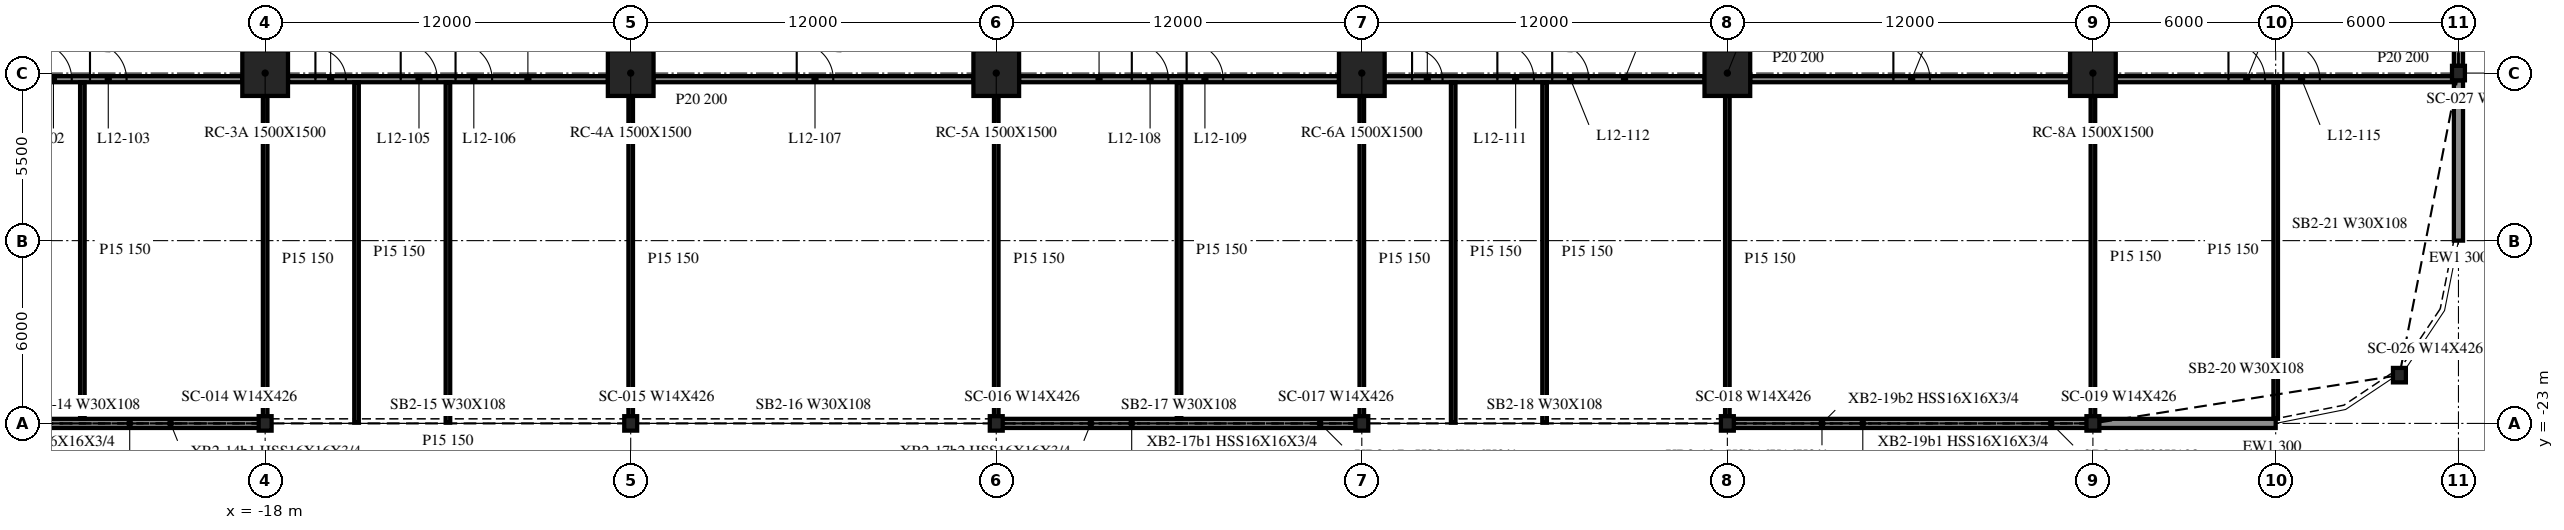
"""IFC4 building model, lengths in metres.
Left out: names, types, materials, properties, quantities, classifications, styles, units other than length and angle.
Written with IfcOpenShell. Run it as: python <this file> out.ifc"""

import sys

from ifc_helpers import new_model, si_unit, direction, frame, frame_2d, origin, origin_2d, place, context, subcontext, project, spatial, rectangle, i_section, extrude, element, fill, save


model = new_model("IFC4")
c1 = context("Model", 3, precision=1e-05, world=origin(), true_north=direction((0.0, 1.0)))
c2 = subcontext(c1, "Body", "Model", "MODEL_VIEW")
j1 = project(units=[si_unit("LENGTHUNIT", "METRE"), si_unit("PLANEANGLEUNIT", "RADIAN")], contexts=[c1])
p1 = place(None, origin())
s1 = spatial("IfcSite", under=j1, at=p1, CompositionType="ELEMENT")
p2 = place(p1, origin())
s2 = spatial("IfcBuilding", under=s1, at=p2, CompositionType="ELEMENT")
p3 = place(p2, frame((0.0, 0.0, 54.6)))
s3 = spatial("IfcBuildingStorey", under=s2, at=p3, CompositionType="ELEMENT", Elevation=54.6)
for number, where, z_axis, x_axis in (
    (1, (-18.0, -11.5, -0.34), (0.0, 0.0, 1.0), (1.0, 0.0, 0.0)),
    (2, (-6.0, -11.5, -0.34), (0.0, 0.0, 1.0), (1.0, 0.0, 0.0)),
    (3, (6.0, -11.5, -0.34), (0.0, 0.0, 1.0), (1.0, 0.0, 0.0)),
    (4, (18.0, -11.5, -0.34), (0.0, 0.0, 1.0), (1.0, 0.0, 0.0)),
    (5, (30.0, -11.5, -0.34), (0.0, 0.0, 1.0), (1.0, 0.0, 0.0)),
    (6, (42.0, -11.5, -0.34), (0.0, 0.0, 1.0), (1.0, 0.0, 0.0)),
):
    element("IfcColumn", number, at=place(p3, frame(where, z_axis=z_axis, x_axis=x_axis)), inside=s3, PredefinedType="COLUMN", context=c2, shape_type="SweptSolid", body=[
        extrude(rectangle(XDim=1.5, YDim=1.5, at=origin_2d()), origin(), (0.0, 0.0, 1.0), 4.3),
    ])
for number, where, z_axis, x_axis in (
    (7, (-18.0, -23.0, -0.34), (0.0, 0.0, 1.0), (1.0, 0.0, 0.0)),
    (8, (-6.0, -23.0, -0.34), (0.0, 0.0, 1.0), (1.0, 0.0, 0.0)),
    (9, (6.0, -23.0, -0.34), (0.0, 0.0, 1.0), (1.0, 0.0, 0.0)),
    (10, (18.0, -23.0, -0.34), (0.0, 0.0, 1.0), (1.0, 0.0, 0.0)),
    (11, (30.0, -23.0, -0.34), (0.0, 0.0, 1.0), (1.0, 0.0, 0.0)),
    (12, (42.0, -23.0, -0.34), (0.0, 0.0, 1.0), (1.0, 0.0, 0.0)),
    (13, (52.062, -21.416, -0.34), (0.0, 0.0, 1.0), (1.0, 0.0, 0.0)),
    (14, (54.0, -11.5, -0.34), (0.0, 0.0, 1.0), (1.0, 0.0, 0.0)),
):
    element("IfcColumn", number, at=place(p3, frame(where, z_axis=z_axis, x_axis=x_axis)), inside=s3, PredefinedType="COLUMN", context=c2, shape_type="SweptSolid", body=[
        extrude(i_section(OverallWidth=0.424, OverallDepth=0.475, WebThickness=0.048, FlangeThickness=0.077, at=origin_2d()), origin(), (0.0, 0.0, 1.0), 4.3),
    ])
for number, where, z_axis, x_axis in (
    (15, (-29.976, -23.0, 0.0), (0.0, 0.0, 1.0), (1.0, 0.0, 0.0)),
    (16, (6.024, -23.0, 0.0), (0.0, 0.0, 1.0), (1.0, 0.0, 0.0)),
    (17, (30.024, -23.0, 0.0), (0.0, 0.0, 1.0), (1.0, 0.0, 0.0)),
):
    element("IfcWall", number, at=place(p3, frame(where, z_axis=z_axis, x_axis=x_axis)), inside=s3, PredefinedType="NOTDEFINED", context=c2, shape_type="SweptSolid", body=[
        extrude(rectangle(XDim=11.952, YDim=0.3, at=frame_2d((5.976, 0.0))), origin(), (0.0, 0.0, 1.0), 3.203),
    ])
p4 = place(p3, frame((42.024, -23.0, 0.0), z_axis=(0.0, 0.0, 1.0), x_axis=(1.0, 0.0, 0.0)))
e18 = element("IfcWall", 18, at=p4, inside=s3, PredefinedType="NOTDEFINED", context=c2, shape_type="SweptSolid", body=[
    extrude(rectangle(XDim=5.976, YDim=0.3, at=frame_2d((2.988, 0.0))), origin(), (0.0, 0.0, 1.0), 3.203),
])
p5 = place(p3, frame((54.0, -17.0, 0.0), z_axis=(0.0, 0.0, 1.0), x_axis=(0.0, 1.0, 0.0)))
e19 = element("IfcWall", 19, at=p5, inside=s3, PredefinedType="NOTDEFINED", context=c2, shape_type="SweptSolid", body=[
    extrude(rectangle(XDim=5.262, YDim=0.3, at=frame_2d((2.631, 0.0))), origin(), (0.0, 0.0, 1.0), 3.203),
])
p6 = place(p3, frame((54.0, -11.262, 0.0), z_axis=(0.0, 0.0, 1.0), x_axis=(0.0, 1.0, 0.0)))
e20 = element("IfcWall", 20, at=p6, inside=s3, PredefinedType="NOTDEFINED", context=c2, shape_type="SweptSolid", body=[
    extrude(rectangle(XDim=11.024, YDim=0.3, at=frame_2d((5.512, 0.0))), origin(), (0.0, 0.0, 1.0), 3.203),
])
p7 = place(p3, frame((-29.25, -11.7, 0.0), z_axis=(0.0, 0.0, 1.0), x_axis=(1.0, 0.0, 0.0)))
e21 = element("IfcWall", 21, at=p7, inside=s3, PredefinedType="PARTITIONING", context=c2, shape_type="SweptSolid", body=[
    extrude(rectangle(XDim=10.5, YDim=0.2, at=frame_2d((5.25, 0.0))), origin(), (0.0, 0.0, 1.0), 3.96),
])
p8 = place(p7, frame((3.7, 0.0, 0.0)))
e22 = element("IfcOpeningElement", 22, at=p8, cuts=e21, PredefinedType="OPENING", context=c2, shape_type="SweptSolid", body=[
    extrude(rectangle(XDim=1.2, YDim=2.1, at=frame_2d((0.6, 1.05))), frame((0.0, 0.11, 0.0), z_axis=(0.0, -1.0, 0.0), x_axis=(1.0, 0.0, 0.0)), (0.0, 0.0, 1.0), 0.22),
])
p9 = place(p7, frame((5.5, 0.0, 0.0)))
e23 = element("IfcOpeningElement", 23, at=p9, cuts=e21, PredefinedType="OPENING", context=c2, shape_type="SweptSolid", body=[
    extrude(rectangle(XDim=1.2, YDim=2.1, at=frame_2d((0.6, 1.05))), frame((0.0, 0.11, 0.0), z_axis=(0.0, -1.0, 0.0), x_axis=(1.0, 0.0, 0.0)), (0.0, 0.0, 1.0), 0.22),
])
p10 = place(p3, frame((-17.25, -11.7, 0.0), z_axis=(0.0, 0.0, 1.0), x_axis=(1.0, 0.0, 0.0)))
e24 = element("IfcWall", 24, at=p10, inside=s3, PredefinedType="PARTITIONING", context=c2, shape_type="SweptSolid", body=[
    extrude(rectangle(XDim=10.5, YDim=0.2, at=frame_2d((5.25, 0.0))), origin(), (0.0, 0.0, 1.0), 3.96),
])
p11 = place(p10, frame((0.9, 0.0, 0.0)))
e25 = element("IfcOpeningElement", 25, at=p11, cuts=e24, PredefinedType="OPENING", context=c2, shape_type="SweptSolid", body=[
    extrude(rectangle(XDim=1.0, YDim=2.1, at=frame_2d((0.5, 1.05))), frame((0.0, 0.11, 0.0), z_axis=(0.0, -1.0, 0.0), x_axis=(1.0, 0.0, 0.0)), (0.0, 0.0, 1.0), 0.22),
])
p12 = place(p10, frame((3.7, 0.0, 0.0)))
e26 = element("IfcOpeningElement", 26, at=p12, cuts=e24, PredefinedType="OPENING", context=c2, shape_type="SweptSolid", body=[
    extrude(rectangle(XDim=1.2, YDim=2.1, at=frame_2d((0.6, 1.05))), frame((0.0, 0.11, 0.0), z_axis=(0.0, -1.0, 0.0), x_axis=(1.0, 0.0, 0.0)), (0.0, 0.0, 1.0), 0.22),
])
p13 = place(p10, frame((5.5, 0.0, 0.0)))
e27 = element("IfcOpeningElement", 27, at=p13, cuts=e24, PredefinedType="OPENING", context=c2, shape_type="SweptSolid", body=[
    extrude(rectangle(XDim=1.2, YDim=2.1, at=frame_2d((0.6, 1.05))), frame((0.0, 0.11, 0.0), z_axis=(0.0, -1.0, 0.0), x_axis=(1.0, 0.0, 0.0)), (0.0, 0.0, 1.0), 0.22),
])
p14 = place(p3, frame((-5.25, -11.7, 0.0), z_axis=(0.0, 0.0, 1.0), x_axis=(1.0, 0.0, 0.0)))
e28 = element("IfcWall", 28, at=p14, inside=s3, PredefinedType="PARTITIONING", context=c2, shape_type="SweptSolid", body=[
    extrude(rectangle(XDim=10.5, YDim=0.2, at=frame_2d((5.25, 0.0))), origin(), (0.0, 0.0, 1.0), 3.96),
])
p15 = place(p14, frame((4.7, 0.0, 0.0)))
e29 = element("IfcOpeningElement", 29, at=p15, cuts=e28, PredefinedType="OPENING", context=c2, shape_type="SweptSolid", body=[
    extrude(rectangle(XDim=1.2, YDim=2.1, at=frame_2d((0.6, 1.05))), frame((0.0, 0.11, 0.0), z_axis=(0.0, -1.0, 0.0), x_axis=(1.0, 0.0, 0.0)), (0.0, 0.0, 1.0), 0.22),
])
p16 = place(p3, frame((6.75, -11.7, 0.0), z_axis=(0.0, 0.0, 1.0), x_axis=(1.0, 0.0, 0.0)))
e30 = element("IfcWall", 30, at=p16, inside=s3, PredefinedType="PARTITIONING", context=c2, shape_type="SweptSolid", body=[
    extrude(rectangle(XDim=10.5, YDim=0.2, at=frame_2d((5.25, 0.0))), origin(), (0.0, 0.0, 1.0), 3.96),
])
p17 = place(p16, frame((3.7, 0.0, 0.0)))
e31 = element("IfcOpeningElement", 31, at=p17, cuts=e30, PredefinedType="OPENING", context=c2, shape_type="SweptSolid", body=[
    extrude(rectangle(XDim=1.2, YDim=2.1, at=frame_2d((0.6, 1.05))), frame((0.0, 0.11, 0.0), z_axis=(0.0, -1.0, 0.0), x_axis=(1.0, 0.0, 0.0)), (0.0, 0.0, 1.0), 0.22),
])
p18 = place(p16, frame((5.5, 0.0, 0.0)))
e32 = element("IfcOpeningElement", 32, at=p18, cuts=e30, PredefinedType="OPENING", context=c2, shape_type="SweptSolid", body=[
    extrude(rectangle(XDim=1.2, YDim=2.1, at=frame_2d((0.6, 1.05))), frame((0.0, 0.11, 0.0), z_axis=(0.0, -1.0, 0.0), x_axis=(1.0, 0.0, 0.0)), (0.0, 0.0, 1.0), 0.22),
])
p19 = place(p3, frame((18.75, -11.7, 0.0), z_axis=(0.0, 0.0, 1.0), x_axis=(1.0, 0.0, 0.0)))
e33 = element("IfcWall", 33, at=p19, inside=s3, PredefinedType="PARTITIONING", context=c2, shape_type="SweptSolid", body=[
    extrude(rectangle(XDim=10.5, YDim=0.2, at=frame_2d((5.25, 0.0))), origin(), (0.0, 0.0, 1.0), 3.96),
])
p20 = place(p19, frame((0.9, 0.0, 0.0)))
e34 = element("IfcOpeningElement", 34, at=p20, cuts=e33, PredefinedType="OPENING", context=c2, shape_type="SweptSolid", body=[
    extrude(rectangle(XDim=1.0, YDim=2.1, at=frame_2d((0.5, 1.05))), frame((0.0, 0.11, 0.0), z_axis=(0.0, -1.0, 0.0), x_axis=(1.0, 0.0, 0.0)), (0.0, 0.0, 1.0), 0.22),
])
p21 = place(p19, frame((3.7, 0.0, 0.0)))
e35 = element("IfcOpeningElement", 35, at=p21, cuts=e33, PredefinedType="OPENING", context=c2, shape_type="SweptSolid", body=[
    extrude(rectangle(XDim=1.2, YDim=2.1, at=frame_2d((0.6, 1.05))), frame((0.0, 0.11, 0.0), z_axis=(0.0, -1.0, 0.0), x_axis=(1.0, 0.0, 0.0)), (0.0, 0.0, 1.0), 0.22),
])
p22 = place(p19, frame((5.5, 0.0, 0.0)))
e36 = element("IfcOpeningElement", 36, at=p22, cuts=e33, PredefinedType="OPENING", context=c2, shape_type="SweptSolid", body=[
    extrude(rectangle(XDim=1.2, YDim=2.1, at=frame_2d((0.6, 1.05))), frame((0.0, 0.11, 0.0), z_axis=(0.0, -1.0, 0.0), x_axis=(1.0, 0.0, 0.0)), (0.0, 0.0, 1.0), 0.22),
])
p23 = place(p3, frame((30.75, -11.7, 0.0), z_axis=(0.0, 0.0, 1.0), x_axis=(1.0, 0.0, 0.0)))
e37 = element("IfcWall", 37, at=p23, inside=s3, PredefinedType="PARTITIONING", context=c2, shape_type="SweptSolid", body=[
    extrude(rectangle(XDim=10.5, YDim=0.2, at=frame_2d((5.25, 0.0))), origin(), (0.0, 0.0, 1.0), 3.96),
])
p24 = place(p23, frame((4.7, 0.0, 0.0)))
e38 = element("IfcOpeningElement", 38, at=p24, cuts=e37, PredefinedType="OPENING", context=c2, shape_type="SweptSolid", body=[
    extrude(rectangle(XDim=1.2, YDim=2.1, at=frame_2d((0.6, 1.05))), frame((0.0, 0.11, 0.0), z_axis=(0.0, -1.0, 0.0), x_axis=(1.0, 0.0, 0.0)), (0.0, 0.0, 1.0), 0.22),
])
p25 = place(p3, frame((42.75, -11.7, 0.0), z_axis=(0.0, 0.0, 1.0), x_axis=(1.0, 0.0, 0.0)))
e39 = element("IfcWall", 39, at=p25, inside=s3, PredefinedType="PARTITIONING", context=c2, shape_type="SweptSolid", body=[
    extrude(rectangle(XDim=11.1, YDim=0.2, at=frame_2d((5.55, 0.0))), origin(), (0.0, 0.0, 1.0), 3.96),
])
p26 = place(p25, frame((3.7, 0.0, 0.0)))
e40 = element("IfcOpeningElement", 40, at=p26, cuts=e39, PredefinedType="OPENING", context=c2, shape_type="SweptSolid", body=[
    extrude(rectangle(XDim=1.2, YDim=2.1, at=frame_2d((0.6, 1.05))), frame((0.0, 0.11, 0.0), z_axis=(0.0, -1.0, 0.0), x_axis=(1.0, 0.0, 0.0)), (0.0, 0.0, 1.0), 0.22),
])
p27 = place(p25, frame((5.5, 0.0, 0.0)))
e41 = element("IfcOpeningElement", 41, at=p27, cuts=e39, PredefinedType="OPENING", context=c2, shape_type="SweptSolid", body=[
    extrude(rectangle(XDim=1.2, YDim=2.1, at=frame_2d((0.6, 1.05))), frame((0.0, 0.11, 0.0), z_axis=(0.0, -1.0, 0.0), x_axis=(1.0, 0.0, 0.0)), (0.0, 0.0, 1.0), 0.22),
])
p28 = place(p3, frame((-24.0, -22.85, 0.0), z_axis=(0.0, 0.0, 1.0), x_axis=(0.0, 1.0, 0.0)))
e42 = element("IfcWall", 42, at=p28, inside=s3, PredefinedType="PARTITIONING", context=c2, shape_type="SweptSolid", body=[
    extrude(rectangle(XDim=11.05, YDim=0.15, at=frame_2d((5.525, 0.0))), origin(), (0.0, 0.0, 1.0), 3.96),
])
p29 = place(p3, frame((-18.0, -22.975, 0.0), z_axis=(0.0, 0.0, 1.0), x_axis=(0.0, 1.0, 0.0)))
e43 = element("IfcWall", 43, at=p29, inside=s3, PredefinedType="PARTITIONING", context=c2, shape_type="SweptSolid", body=[
    extrude(rectangle(XDim=10.725, YDim=0.15, at=frame_2d((5.363, 0.0))), origin(), (0.0, 0.0, 1.0), 3.96),
])
for number, where, z_axis, x_axis in (
    (44, (-15.0, -22.975, 0.0), (0.0, 0.0, 1.0), (0.0, 1.0, 0.0)),
    (45, (-12.0, -22.975, 0.0), (0.0, 0.0, 1.0), (0.0, 1.0, 0.0)),
):
    element("IfcWall", number, at=place(p3, frame(where, z_axis=z_axis, x_axis=x_axis)), inside=s3, PredefinedType="PARTITIONING", context=c2, shape_type="SweptSolid", body=[
        extrude(rectangle(XDim=11.175, YDim=0.15, at=frame_2d((5.587, 0.0))), origin(), (0.0, 0.0, 1.0), 3.96),
    ])
for number, where, z_axis, x_axis in (
    (46, (-6.0, -22.975, 0.0), (0.0, 0.0, 1.0), (0.0, 1.0, 0.0)),
    (47, (6.0, -22.975, 0.0), (0.0, 0.0, 1.0), (0.0, 1.0, 0.0)),
):
    element("IfcWall", number, at=place(p3, frame(where, z_axis=z_axis, x_axis=x_axis)), inside=s3, PredefinedType="PARTITIONING", context=c2, shape_type="SweptSolid", body=[
        extrude(rectangle(XDim=10.725, YDim=0.15, at=frame_2d((5.363, 0.0))), origin(), (0.0, 0.0, 1.0), 3.96),
    ])
p30 = place(p3, frame((12.0, -22.85, 0.0), z_axis=(0.0, 0.0, 1.0), x_axis=(0.0, 1.0, 0.0)))
e48 = element("IfcWall", 48, at=p30, inside=s3, PredefinedType="PARTITIONING", context=c2, shape_type="SweptSolid", body=[
    extrude(rectangle(XDim=11.05, YDim=0.15, at=frame_2d((5.525, 0.0))), origin(), (0.0, 0.0, 1.0), 3.96),
])
p31 = place(p3, frame((18.0, -22.975, 0.0), z_axis=(0.0, 0.0, 1.0), x_axis=(0.0, 1.0, 0.0)))
e49 = element("IfcWall", 49, at=p31, inside=s3, PredefinedType="PARTITIONING", context=c2, shape_type="SweptSolid", body=[
    extrude(rectangle(XDim=10.725, YDim=0.15, at=frame_2d((5.363, 0.0))), origin(), (0.0, 0.0, 1.0), 3.96),
])
for number, where, z_axis, x_axis in (
    (50, (21.0, -22.975, 0.0), (0.0, 0.0, 1.0), (0.0, 1.0, 0.0)),
    (51, (24.0, -22.975, 0.0), (0.0, 0.0, 1.0), (0.0, 1.0, 0.0)),
):
    element("IfcWall", number, at=place(p3, frame(where, z_axis=z_axis, x_axis=x_axis)), inside=s3, PredefinedType="PARTITIONING", context=c2, shape_type="SweptSolid", body=[
        extrude(rectangle(XDim=11.175, YDim=0.15, at=frame_2d((5.587, 0.0))), origin(), (0.0, 0.0, 1.0), 3.96),
    ])
p32 = place(p3, frame((30.0, -22.975, 0.0), z_axis=(0.0, 0.0, 1.0), x_axis=(0.0, 1.0, 0.0)))
e52 = element("IfcWall", 52, at=p32, inside=s3, PredefinedType="PARTITIONING", context=c2, shape_type="SweptSolid", body=[
    extrude(rectangle(XDim=10.725, YDim=0.15, at=frame_2d((5.363, 0.0))), origin(), (0.0, 0.0, 1.0), 3.96),
])
p33 = place(p3, frame((42.0, -22.85, 0.0), z_axis=(0.0, 0.0, 1.0), x_axis=(0.0, 1.0, 0.0)))
e53 = element("IfcWall", 53, at=p33, inside=s3, PredefinedType="PARTITIONING", context=c2, shape_type="SweptSolid", body=[
    extrude(rectangle(XDim=10.6, YDim=0.15, at=frame_2d((5.3, 0.0))), origin(), (0.0, 0.0, 1.0), 3.96),
])
p34 = place(p3, frame((48.0, -22.847, 0.0), z_axis=(0.0, 0.0, 1.0), x_axis=(0.0, 1.0, 0.0)))
e54 = element("IfcWall", 54, at=p34, inside=s3, PredefinedType="PARTITIONING", context=c2, shape_type="SweptSolid", body=[
    extrude(rectangle(XDim=11.047, YDim=0.15, at=frame_2d((5.523, 0.0))), origin(), (0.0, 0.0, 1.0), 3.96),
])
p35 = place(p8, origin())
e55 = element("IfcDoor", 55, at=p35, inside=s3, OperationType="SINGLE_SWING_RIGHT", PredefinedType="DOOR", context=c2, shape_type="SweptSolid", body=[
    extrude(rectangle(XDim=1.2, YDim=2.1, at=frame_2d((0.6, 1.05))), frame((0.0, 0.025, 0.0), z_axis=(0.0, -1.0, 0.0), x_axis=(1.0, 0.0, 0.0)), (0.0, 0.0, 1.0), 0.05),
])
fill(e22, e55)
p36 = place(p9, origin())
e56 = element("IfcDoor", 56, at=p36, inside=s3, OperationType="SINGLE_SWING_LEFT", PredefinedType="DOOR", context=c2, shape_type="SweptSolid", body=[
    extrude(rectangle(XDim=1.2, YDim=2.1, at=frame_2d((0.6, 1.05))), frame((0.0, 0.025, 0.0), z_axis=(0.0, -1.0, 0.0), x_axis=(1.0, 0.0, 0.0)), (0.0, 0.0, 1.0), 0.05),
])
fill(e23, e56)
p37 = place(p11, origin())
e57 = element("IfcDoor", 57, at=p37, inside=s3, OperationType="SINGLE_SWING_RIGHT", PredefinedType="DOOR", context=c2, shape_type="SweptSolid", body=[
    extrude(rectangle(XDim=1.0, YDim=2.1, at=frame_2d((0.5, 1.05))), frame((0.0, 0.025, 0.0), z_axis=(0.0, -1.0, 0.0), x_axis=(1.0, 0.0, 0.0)), (0.0, 0.0, 1.0), 0.05),
])
fill(e25, e57)
p38 = place(p12, origin())
e58 = element("IfcDoor", 58, at=p38, inside=s3, OperationType="SINGLE_SWING_RIGHT", PredefinedType="DOOR", context=c2, shape_type="SweptSolid", body=[
    extrude(rectangle(XDim=1.2, YDim=2.1, at=frame_2d((0.6, 1.05))), frame((0.0, 0.025, 0.0), z_axis=(0.0, -1.0, 0.0), x_axis=(1.0, 0.0, 0.0)), (0.0, 0.0, 1.0), 0.05),
])
fill(e26, e58)
p39 = place(p13, origin())
e59 = element("IfcDoor", 59, at=p39, inside=s3, OperationType="SINGLE_SWING_LEFT", PredefinedType="DOOR", context=c2, shape_type="SweptSolid", body=[
    extrude(rectangle(XDim=1.2, YDim=2.1, at=frame_2d((0.6, 1.05))), frame((0.0, 0.025, 0.0), z_axis=(0.0, -1.0, 0.0), x_axis=(1.0, 0.0, 0.0)), (0.0, 0.0, 1.0), 0.05),
])
fill(e27, e59)
p40 = place(p15, origin())
e60 = element("IfcDoor", 60, at=p40, inside=s3, OperationType="SINGLE_SWING_LEFT", PredefinedType="DOOR", context=c2, shape_type="SweptSolid", body=[
    extrude(rectangle(XDim=1.2, YDim=2.1, at=frame_2d((0.6, 1.05))), frame((0.0, 0.025, 0.0), z_axis=(0.0, -1.0, 0.0), x_axis=(1.0, 0.0, 0.0)), (0.0, 0.0, 1.0), 0.05),
])
fill(e29, e60)
p41 = place(p17, origin())
e61 = element("IfcDoor", 61, at=p41, inside=s3, OperationType="SINGLE_SWING_RIGHT", PredefinedType="DOOR", context=c2, shape_type="SweptSolid", body=[
    extrude(rectangle(XDim=1.2, YDim=2.1, at=frame_2d((0.6, 1.05))), frame((0.0, 0.025, 0.0), z_axis=(0.0, -1.0, 0.0), x_axis=(1.0, 0.0, 0.0)), (0.0, 0.0, 1.0), 0.05),
])
fill(e31, e61)
p42 = place(p18, origin())
e62 = element("IfcDoor", 62, at=p42, inside=s3, OperationType="SINGLE_SWING_LEFT", PredefinedType="DOOR", context=c2, shape_type="SweptSolid", body=[
    extrude(rectangle(XDim=1.2, YDim=2.1, at=frame_2d((0.6, 1.05))), frame((0.0, 0.025, 0.0), z_axis=(0.0, -1.0, 0.0), x_axis=(1.0, 0.0, 0.0)), (0.0, 0.0, 1.0), 0.05),
])
fill(e32, e62)
p43 = place(p20, origin())
e63 = element("IfcDoor", 63, at=p43, inside=s3, OperationType="SINGLE_SWING_RIGHT", PredefinedType="DOOR", context=c2, shape_type="SweptSolid", body=[
    extrude(rectangle(XDim=1.0, YDim=2.1, at=frame_2d((0.5, 1.05))), frame((0.0, 0.025, 0.0), z_axis=(0.0, -1.0, 0.0), x_axis=(1.0, 0.0, 0.0)), (0.0, 0.0, 1.0), 0.05),
])
fill(e34, e63)
p44 = place(p21, origin())
e64 = element("IfcDoor", 64, at=p44, inside=s3, OperationType="SINGLE_SWING_RIGHT", PredefinedType="DOOR", context=c2, shape_type="SweptSolid", body=[
    extrude(rectangle(XDim=1.2, YDim=2.1, at=frame_2d((0.6, 1.05))), frame((0.0, 0.025, 0.0), z_axis=(0.0, -1.0, 0.0), x_axis=(1.0, 0.0, 0.0)), (0.0, 0.0, 1.0), 0.05),
])
fill(e35, e64)
p45 = place(p22, origin())
e65 = element("IfcDoor", 65, at=p45, inside=s3, OperationType="SINGLE_SWING_LEFT", PredefinedType="DOOR", context=c2, shape_type="SweptSolid", body=[
    extrude(rectangle(XDim=1.2, YDim=2.1, at=frame_2d((0.6, 1.05))), frame((0.0, 0.025, 0.0), z_axis=(0.0, -1.0, 0.0), x_axis=(1.0, 0.0, 0.0)), (0.0, 0.0, 1.0), 0.05),
])
fill(e36, e65)
p46 = place(p24, origin())
e66 = element("IfcDoor", 66, at=p46, inside=s3, OperationType="SINGLE_SWING_LEFT", PredefinedType="DOOR", context=c2, shape_type="SweptSolid", body=[
    extrude(rectangle(XDim=1.2, YDim=2.1, at=frame_2d((0.6, 1.05))), frame((0.0, 0.025, 0.0), z_axis=(0.0, -1.0, 0.0), x_axis=(1.0, 0.0, 0.0)), (0.0, 0.0, 1.0), 0.05),
])
fill(e38, e66)
p47 = place(p26, origin())
e67 = element("IfcDoor", 67, at=p47, inside=s3, OperationType="SINGLE_SWING_RIGHT", PredefinedType="DOOR", context=c2, shape_type="SweptSolid", body=[
    extrude(rectangle(XDim=1.2, YDim=2.1, at=frame_2d((0.6, 1.05))), frame((0.0, 0.025, 0.0), z_axis=(0.0, -1.0, 0.0), x_axis=(1.0, 0.0, 0.0)), (0.0, 0.0, 1.0), 0.05),
])
fill(e40, e67)
p48 = place(p27, origin())
e68 = element("IfcDoor", 68, at=p48, inside=s3, OperationType="SINGLE_SWING_LEFT", PredefinedType="DOOR", context=c2, shape_type="SweptSolid", body=[
    extrude(rectangle(XDim=1.2, YDim=2.1, at=frame_2d((0.6, 1.05))), frame((0.0, 0.025, 0.0), z_axis=(0.0, -1.0, 0.0), x_axis=(1.0, 0.0, 0.0)), (0.0, 0.0, 1.0), 0.05),
])
fill(e41, e68)
save(model, sys.argv[1])
